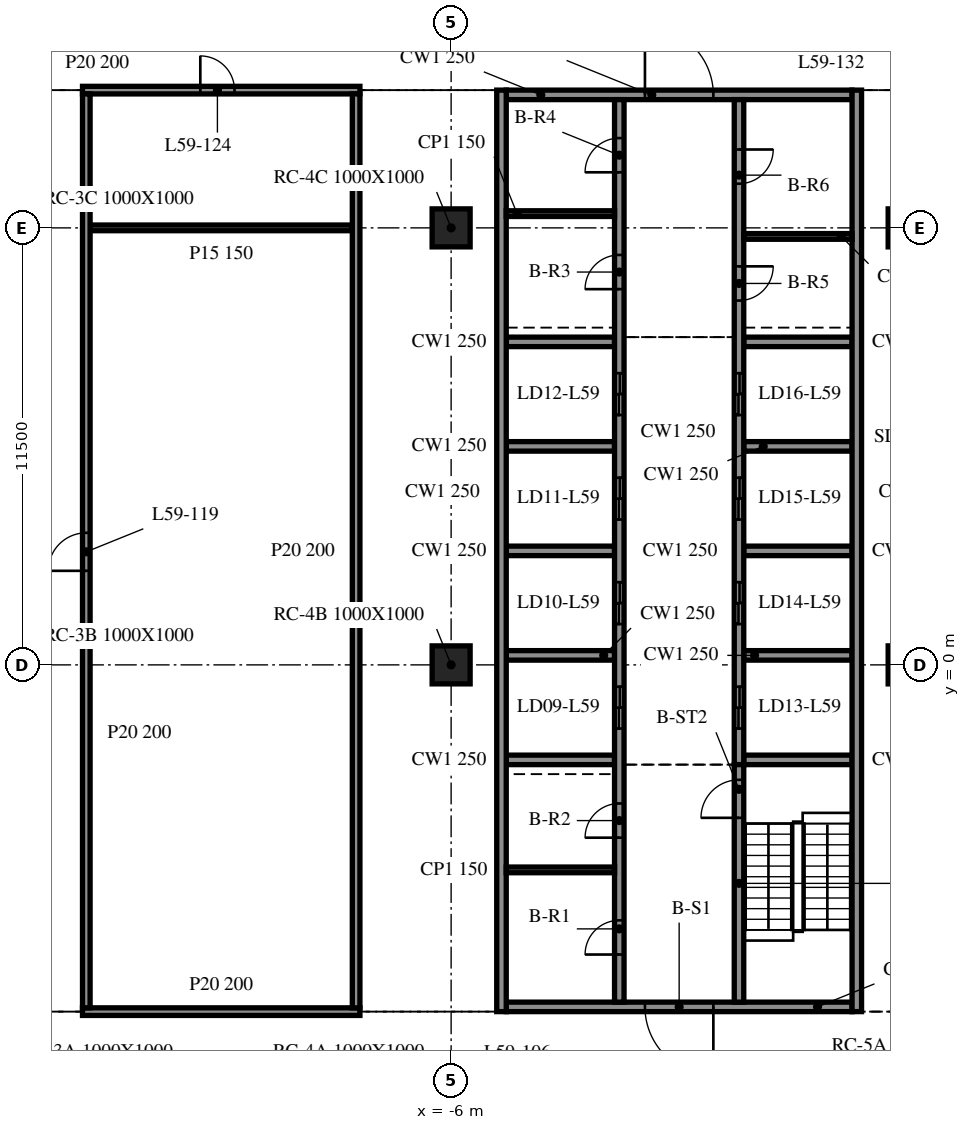
"""IFC4 building model, lengths in metres.
Left out: names, types, materials, properties, quantities, classifications, styles, units other than length and angle.
Written with IfcOpenShell. Run it as: python <this file> out.ifc"""

import sys

from ifc_helpers import new_model, si_unit, direction, frame, frame_2d, origin, origin_2d, place, context, subcontext, project, spatial, rectangle, extrude, element, fill, save


model = new_model("IFC4")
c1 = context("Model", 3, precision=1e-05, world=origin(), true_north=direction((0.0, 1.0)))
c2 = subcontext(c1, "Body", "Model", "MODEL_VIEW")
j1 = project(units=[si_unit("LENGTHUNIT", "METRE"), si_unit("PLANEANGLEUNIT", "RADIAN")], contexts=[c1])
p1 = place(None, origin())
s1 = spatial("IfcSite", under=j1, at=p1, CompositionType="ELEMENT")
p2 = place(p1, origin())
s2 = spatial("IfcBuilding", under=s1, at=p2, CompositionType="ELEMENT")
p3 = place(p2, frame((0.0, 0.0, 243.8)))
s3 = spatial("IfcBuildingStorey", under=s2, at=p3, CompositionType="ELEMENT", Elevation=243.8)
for number, where, z_axis, x_axis in (
    (1, (-6.0, 0.0, -0.34), (0.0, 0.0, 1.0), (1.0, 0.0, 0.0)),
    (2, (-6.0, 11.5, -0.34), (0.0, 0.0, 1.0), (1.0, 0.0, 0.0)),
    (3, (6.0, 0.0, -0.34), (0.0, 0.0, 1.0), (1.0, 0.0, 0.0)),
    (4, (6.0, 11.5, -0.34), (0.0, 0.0, 1.0), (1.0, 0.0, 0.0)),
):
    element("IfcColumn", number, at=place(p3, frame(where, z_axis=z_axis, x_axis=x_axis)), inside=s3, PredefinedType="COLUMN", context=c2, shape_type="SweptSolid", body=[
        extrude(rectangle(XDim=1.0, YDim=1.0, at=origin_2d()), origin(), (0.0, 0.0, 1.0), 3.8),
    ])
for number, where, z_axis, x_axis in (
    (5, (-4.675, 15.125, 0.0), (0.0, 0.0, 1.0), (0.0, -1.0, 0.0)),
    (6, (4.675, -9.125, 0.0), (0.0, 0.0, 1.0), (0.0, 1.0, 0.0)),
):
    element("IfcWall", number, at=place(p3, frame(where, z_axis=z_axis, x_axis=x_axis)), inside=s3, PredefinedType="SOLIDWALL", context=c2, shape_type="SweptSolid", body=[
        extrude(rectangle(XDim=24.25, YDim=0.25, at=frame_2d((12.125, 0.0))), origin(), (0.0, 0.0, 1.0), 3.46),
    ])
p4 = place(p3, frame((4.55, -9.0, 0.0), z_axis=(0.0, 0.0, 1.0), x_axis=(-1.0, 0.0, 0.0)))
e7 = element("IfcWall", 7, at=p4, inside=s3, PredefinedType="SOLIDWALL", context=c2, shape_type="SweptSolid", body=[
    extrude(rectangle(XDim=9.1, YDim=0.25, at=frame_2d((4.55, 0.0))), origin(), (0.0, 0.0, 1.0), 3.46),
])
p5 = place(p4, frame((3.65, 0.0, 0.0)))
e8 = element("IfcOpeningElement", 8, at=p5, cuts=e7, PredefinedType="OPENING", context=c2, shape_type="SweptSolid", body=[
    extrude(rectangle(XDim=1.8, YDim=2.1, at=frame_2d((0.9, 1.05))), frame((0.0, 0.135, 0.0), z_axis=(0.0, -1.0, 0.0), x_axis=(1.0, 0.0, 0.0)), (0.0, 0.0, 1.0), 0.27),
])
p6 = place(p3, frame((-4.55, 15.0, 0.0), z_axis=(0.0, 0.0, 1.0), x_axis=(1.0, 0.0, 0.0)))
e9 = element("IfcWall", 9, at=p6, inside=s3, PredefinedType="SOLIDWALL", context=c2, shape_type="SweptSolid", body=[
    extrude(rectangle(XDim=9.1, YDim=0.25, at=frame_2d((4.55, 0.0))), origin(), (0.0, 0.0, 1.0), 3.46),
])
p7 = place(p6, frame((3.65, 0.0, 0.0)))
e10 = element("IfcOpeningElement", 10, at=p7, cuts=e9, PredefinedType="OPENING", context=c2, shape_type="SweptSolid", body=[
    extrude(rectangle(XDim=1.8, YDim=2.1, at=frame_2d((0.9, 1.05))), frame((0.0, 0.135, 0.0), z_axis=(0.0, -1.0, 0.0), x_axis=(1.0, 0.0, 0.0)), (0.0, 0.0, 1.0), 0.27),
])
p8 = place(p3, frame((-1.575, -8.875, 0.0), z_axis=(0.0, 0.0, 1.0), x_axis=(0.0, 1.0, 0.0)))
e11 = element("IfcWall", 11, at=p8, inside=s3, PredefinedType="SOLIDWALL", context=c2, shape_type="SweptSolid", body=[
    extrude(rectangle(XDim=23.75, YDim=0.25, at=frame_2d((11.875, 0.0))), origin(), (0.0, 0.0, 1.0), 3.46),
])
p9 = place(p8, frame((7.2, 0.0, 0.0)))
e12 = element("IfcOpeningElement", 12, at=p9, cuts=e11, PredefinedType="OPENING", context=c2, shape_type="SweptSolid", body=[
    extrude(rectangle(XDim=1.1, YDim=2.1, at=frame_2d((0.55, 1.05))), frame((0.0, 0.135, 0.0), z_axis=(0.0, -1.0, 0.0), x_axis=(1.0, 0.0, 0.0)), (0.0, 0.0, 1.0), 0.27),
])
p10 = place(p8, frame((9.95, 0.0, 0.0)))
e13 = element("IfcOpeningElement", 13, at=p10, cuts=e11, PredefinedType="OPENING", context=c2, shape_type="SweptSolid", body=[
    extrude(rectangle(XDim=1.1, YDim=2.1, at=frame_2d((0.55, 1.05))), frame((0.0, 0.135, 0.0), z_axis=(0.0, -1.0, 0.0), x_axis=(1.0, 0.0, 0.0)), (0.0, 0.0, 1.0), 0.27),
])
p11 = place(p8, frame((12.7, 0.0, 0.0)))
e14 = element("IfcOpeningElement", 14, at=p11, cuts=e11, PredefinedType="OPENING", context=c2, shape_type="SweptSolid", body=[
    extrude(rectangle(XDim=1.1, YDim=2.1, at=frame_2d((0.55, 1.05))), frame((0.0, 0.135, 0.0), z_axis=(0.0, -1.0, 0.0), x_axis=(1.0, 0.0, 0.0)), (0.0, 0.0, 1.0), 0.27),
])
p12 = place(p8, frame((15.45, 0.0, 0.0)))
e15 = element("IfcOpeningElement", 15, at=p12, cuts=e11, PredefinedType="OPENING", context=c2, shape_type="SweptSolid", body=[
    extrude(rectangle(XDim=1.1, YDim=2.1, at=frame_2d((0.55, 1.05))), frame((0.0, 0.135, 0.0), z_axis=(0.0, -1.0, 0.0), x_axis=(1.0, 0.0, 0.0)), (0.0, 0.0, 1.0), 0.27),
])
p13 = place(p8, frame((1.252, 0.0, 0.0)))
e16 = element("IfcOpeningElement", 16, at=p13, cuts=e11, PredefinedType="OPENING", context=c2, shape_type="SweptSolid", body=[
    extrude(rectangle(XDim=0.9, YDim=2.1, at=frame_2d((0.45, 1.05))), frame((0.0, 0.135, 0.0), z_axis=(0.0, -1.0, 0.0), x_axis=(1.0, 0.0, 0.0)), (0.0, 0.0, 1.0), 0.27),
])
p14 = place(p8, frame((4.327, 0.0, 0.0)))
e17 = element("IfcOpeningElement", 17, at=p14, cuts=e11, PredefinedType="OPENING", context=c2, shape_type="SweptSolid", body=[
    extrude(rectangle(XDim=0.9, YDim=2.1, at=frame_2d((0.45, 1.05))), frame((0.0, 0.135, 0.0), z_axis=(0.0, -1.0, 0.0), x_axis=(1.0, 0.0, 0.0)), (0.0, 0.0, 1.0), 0.27),
])
p15 = place(p8, frame((18.762, 0.0, 0.0)))
e18 = element("IfcOpeningElement", 18, at=p15, cuts=e11, PredefinedType="OPENING", context=c2, shape_type="SweptSolid", body=[
    extrude(rectangle(XDim=0.9, YDim=2.1, at=frame_2d((0.45, 1.05))), frame((0.0, 0.135, 0.0), z_axis=(0.0, -1.0, 0.0), x_axis=(1.0, 0.0, 0.0)), (0.0, 0.0, 1.0), 0.27),
])
p16 = place(p8, frame((21.837, 0.0, 0.0)))
e19 = element("IfcOpeningElement", 19, at=p16, cuts=e11, PredefinedType="OPENING", context=c2, shape_type="SweptSolid", body=[
    extrude(rectangle(XDim=0.9, YDim=2.1, at=frame_2d((0.45, 1.05))), frame((0.0, 0.135, 0.0), z_axis=(0.0, -1.0, 0.0), x_axis=(1.0, 0.0, 0.0)), (0.0, 0.0, 1.0), 0.27),
])
p17 = place(p3, frame((1.575, -8.875, 0.0), z_axis=(0.0, 0.0, 1.0), x_axis=(0.0, 1.0, 0.0)))
e20 = element("IfcWall", 20, at=p17, inside=s3, PredefinedType="SOLIDWALL", context=c2, shape_type="SweptSolid", body=[
    extrude(rectangle(XDim=6.25, YDim=0.25, at=frame_2d((3.125, 0.0))), origin(), (0.0, 0.0, 1.0), 3.46),
])
p18 = place(p17, frame((4.85, 0.0, 0.0)))
e21 = element("IfcOpeningElement", 21, at=p18, cuts=e20, PredefinedType="OPENING", context=c2, shape_type="SweptSolid", body=[
    extrude(rectangle(XDim=1.0, YDim=2.1, at=frame_2d((0.5, 1.05))), frame((0.0, 0.135, 0.0), z_axis=(0.0, -1.0, 0.0), x_axis=(1.0, 0.0, 0.0)), (0.0, 0.0, 1.0), 0.27),
])
p19 = place(p3, frame((1.575, 14.875, 0.0), z_axis=(0.0, 0.0, 1.0), x_axis=(0.0, -1.0, 0.0)))
e22 = element("IfcWall", 22, at=p19, inside=s3, PredefinedType="SOLIDWALL", context=c2, shape_type="SweptSolid", body=[
    extrude(rectangle(XDim=17.5, YDim=0.25, at=frame_2d((8.75, 0.0))), origin(), (0.0, 0.0, 1.0), 3.46),
])
p20 = place(p19, frame((15.45, 0.0, 0.0)))
e23 = element("IfcOpeningElement", 23, at=p20, cuts=e22, PredefinedType="OPENING", context=c2, shape_type="SweptSolid", body=[
    extrude(rectangle(XDim=1.1, YDim=2.1, at=frame_2d((0.55, 1.05))), frame((0.0, 0.135, 0.0), z_axis=(0.0, -1.0, 0.0), x_axis=(1.0, 0.0, 0.0)), (0.0, 0.0, 1.0), 0.27),
])
p21 = place(p19, frame((12.7, 0.0, 0.0)))
e24 = element("IfcOpeningElement", 24, at=p21, cuts=e22, PredefinedType="OPENING", context=c2, shape_type="SweptSolid", body=[
    extrude(rectangle(XDim=1.1, YDim=2.1, at=frame_2d((0.55, 1.05))), frame((0.0, 0.135, 0.0), z_axis=(0.0, -1.0, 0.0), x_axis=(1.0, 0.0, 0.0)), (0.0, 0.0, 1.0), 0.27),
])
p22 = place(p19, frame((9.95, 0.0, 0.0)))
e25 = element("IfcOpeningElement", 25, at=p22, cuts=e22, PredefinedType="OPENING", context=c2, shape_type="SweptSolid", body=[
    extrude(rectangle(XDim=1.1, YDim=2.1, at=frame_2d((0.55, 1.05))), frame((0.0, 0.135, 0.0), z_axis=(0.0, -1.0, 0.0), x_axis=(1.0, 0.0, 0.0)), (0.0, 0.0, 1.0), 0.27),
])
p23 = place(p19, frame((7.2, 0.0, 0.0)))
e26 = element("IfcOpeningElement", 26, at=p23, cuts=e22, PredefinedType="OPENING", context=c2, shape_type="SweptSolid", body=[
    extrude(rectangle(XDim=1.1, YDim=2.1, at=frame_2d((0.55, 1.05))), frame((0.0, 0.135, 0.0), z_axis=(0.0, -1.0, 0.0), x_axis=(1.0, 0.0, 0.0)), (0.0, 0.0, 1.0), 0.27),
])
p24 = place(p19, frame((4.387, 0.0, 0.0)))
e27 = element("IfcOpeningElement", 27, at=p24, cuts=e22, PredefinedType="OPENING", context=c2, shape_type="SweptSolid", body=[
    extrude(rectangle(XDim=0.9, YDim=2.1, at=frame_2d((0.45, 1.05))), frame((0.0, 0.135, 0.0), z_axis=(0.0, -1.0, 0.0), x_axis=(1.0, 0.0, 0.0)), (0.0, 0.0, 1.0), 0.27),
])
p25 = place(p19, frame((1.312, 0.0, 0.0)))
e28 = element("IfcOpeningElement", 28, at=p25, cuts=e22, PredefinedType="OPENING", context=c2, shape_type="SweptSolid", body=[
    extrude(rectangle(XDim=0.9, YDim=2.1, at=frame_2d((0.45, 1.05))), frame((0.0, 0.135, 0.0), z_axis=(0.0, -1.0, 0.0), x_axis=(1.0, 0.0, 0.0)), (0.0, 0.0, 1.0), 0.27),
])
for number, where, z_axis, x_axis in (
    (29, (-4.55, -2.5, 0.0), (0.0, 0.0, 1.0), (1.0, 0.0, 0.0)),
    (30, (-4.55, 0.25, 0.0), (0.0, 0.0, 1.0), (1.0, 0.0, 0.0)),
    (31, (-4.55, 3.0, 0.0), (0.0, 0.0, 1.0), (1.0, 0.0, 0.0)),
    (32, (-4.55, 5.75, 0.0), (0.0, 0.0, 1.0), (1.0, 0.0, 0.0)),
    (33, (-4.55, 8.5, 0.0), (0.0, 0.0, 1.0), (1.0, 0.0, 0.0)),
    (34, (1.7, -2.5, 0.0), (0.0, 0.0, 1.0), (1.0, 0.0, 0.0)),
    (35, (1.7, 0.25, 0.0), (0.0, 0.0, 1.0), (1.0, 0.0, 0.0)),
    (36, (1.7, 3.0, 0.0), (0.0, 0.0, 1.0), (1.0, 0.0, 0.0)),
    (37, (1.7, 5.75, 0.0), (0.0, 0.0, 1.0), (1.0, 0.0, 0.0)),
    (38, (1.7, 8.5, 0.0), (0.0, 0.0, 1.0), (1.0, 0.0, 0.0)),
):
    element("IfcWall", number, at=place(p3, frame(where, z_axis=z_axis, x_axis=x_axis)), inside=s3, PredefinedType="SOLIDWALL", context=c2, shape_type="SweptSolid", body=[
        extrude(rectangle(XDim=2.85, YDim=0.25, at=frame_2d((1.425, 0.0))), origin(), (0.0, 0.0, 1.0), 3.46),
    ])
for number, where, z_axis, x_axis in (
    (39, (-4.55, -5.395, 0.0), (0.0, 0.0, 1.0), (1.0, 0.0, 0.0)),
    (40, (-4.55, 11.875, 0.0), (0.0, 0.0, 1.0), (1.0, 0.0, 0.0)),
    (41, (1.7, 11.275, 0.0), (0.0, 0.0, 1.0), (1.0, 0.0, 0.0)),
):
    element("IfcWall", number, at=place(p3, frame(where, z_axis=z_axis, x_axis=x_axis)), inside=s3, PredefinedType="PARTITIONING", context=c2, shape_type="SweptSolid", body=[
        extrude(rectangle(XDim=2.85, YDim=0.15, at=frame_2d((1.425, 0.0))), origin(), (0.0, 0.0, 1.0), 3.46),
    ])
p26 = place(p3, frame((-15.7, -9.125, 0.0), z_axis=(0.0, 0.0, 1.0), x_axis=(1.0, 0.0, 0.0)))
e42 = element("IfcWall", 42, at=p26, inside=s3, PredefinedType="PARTITIONING", context=c2, shape_type="SweptSolid", body=[
    extrude(rectangle(XDim=7.3, YDim=0.2, at=frame_2d((3.65, 0.0))), origin(), (0.0, 0.0, 1.0), 3.46),
])
p27 = place(p3, frame((-15.5, 11.5, 0.0), z_axis=(0.0, 0.0, 1.0), x_axis=(1.0, 0.0, 0.0)))
e43 = element("IfcWall", 43, at=p27, inside=s3, PredefinedType="PARTITIONING", context=c2, shape_type="SweptSolid", body=[
    extrude(rectangle(XDim=6.9, YDim=0.15, at=frame_2d((3.45, 0.0))), origin(), (0.0, 0.0, 1.0), 3.46),
])
p28 = place(p3, frame((-15.7, 15.125, 0.0), z_axis=(0.0, 0.0, 1.0), x_axis=(1.0, 0.0, 0.0)))
e44 = element("IfcWall", 44, at=p28, inside=s3, PredefinedType="PARTITIONING", context=c2, shape_type="SweptSolid", body=[
    extrude(rectangle(XDim=7.3, YDim=0.2, at=frame_2d((3.65, 0.0))), origin(), (0.0, 0.0, 1.0), 3.46),
])
p29 = place(p28, frame((3.1, 0.0, 0.0)))
e45 = element("IfcOpeningElement", 45, at=p29, cuts=e44, PredefinedType="OPENING", context=c2, shape_type="SweptSolid", body=[
    extrude(rectangle(XDim=0.9, YDim=2.1, at=frame_2d((0.45, 1.05))), frame((0.0, 0.11, 0.0), z_axis=(0.0, -1.0, 0.0), x_axis=(1.0, 0.0, 0.0)), (0.0, 0.0, 1.0), 0.22),
])
p30 = place(p3, frame((-15.6, -9.025, 0.0), z_axis=(0.0, 0.0, 1.0), x_axis=(0.0, 1.0, 0.0)))
e46 = element("IfcWall", 46, at=p30, inside=s3, PredefinedType="PARTITIONING", context=c2, shape_type="SweptSolid", body=[
    extrude(rectangle(XDim=24.05, YDim=0.2, at=frame_2d((12.025, 0.0))), origin(), (0.0, 0.0, 1.0), 3.46),
])
p31 = place(p30, frame((11.5, 0.0, 0.0)))
e47 = element("IfcOpeningElement", 47, at=p31, cuts=e46, PredefinedType="OPENING", context=c2, shape_type="SweptSolid", body=[
    extrude(rectangle(XDim=1.0, YDim=2.1, at=frame_2d((0.5, 1.05))), frame((0.0, 0.11, 0.0), z_axis=(0.0, -1.0, 0.0), x_axis=(1.0, 0.0, 0.0)), (0.0, 0.0, 1.0), 0.22),
])
p32 = place(p3, frame((-8.5, -9.025, 0.0), z_axis=(0.0, 0.0, 1.0), x_axis=(0.0, 1.0, 0.0)))
e48 = element("IfcWall", 48, at=p32, inside=s3, PredefinedType="PARTITIONING", context=c2, shape_type="SweptSolid", body=[
    extrude(rectangle(XDim=24.05, YDim=0.2, at=frame_2d((12.025, 0.0))), origin(), (0.0, 0.0, 1.0), 3.46),
])
p33 = place(p5, origin())
e49 = element("IfcDoor", 49, at=p33, inside=s3, OperationType="DOUBLE_DOOR_SINGLE_SWING", PredefinedType="DOOR", context=c2, shape_type="SweptSolid", body=[
    extrude(rectangle(XDim=1.8, YDim=2.1, at=frame_2d((0.9, 1.05))), frame((0.0, 0.025, 0.0), z_axis=(0.0, -1.0, 0.0), x_axis=(1.0, 0.0, 0.0)), (0.0, 0.0, 1.0), 0.05),
])
fill(e8, e49)
p34 = place(p7, origin())
e50 = element("IfcDoor", 50, at=p34, inside=s3, OperationType="DOUBLE_DOOR_SINGLE_SWING", PredefinedType="DOOR", context=c2, shape_type="SweptSolid", body=[
    extrude(rectangle(XDim=1.8, YDim=2.1, at=frame_2d((0.9, 1.05))), frame((0.0, 0.025, 0.0), z_axis=(0.0, -1.0, 0.0), x_axis=(1.0, 0.0, 0.0)), (0.0, 0.0, 1.0), 0.05),
])
fill(e10, e50)
p35 = place(p20, origin())
e51 = element("IfcDoor", 51, at=p35, inside=s3, OperationType="DOUBLE_DOOR_SLIDING", PredefinedType="DOOR", context=c2, shape_type="SweptSolid", body=[
    extrude(rectangle(XDim=1.1, YDim=2.1, at=frame_2d((0.55, 1.05))), frame((0.0, 0.025, 0.0), z_axis=(0.0, -1.0, 0.0), x_axis=(1.0, 0.0, 0.0)), (0.0, 0.0, 1.0), 0.05),
])
fill(e23, e51)
p36 = place(p21, origin())
e52 = element("IfcDoor", 52, at=p36, inside=s3, OperationType="DOUBLE_DOOR_SLIDING", PredefinedType="DOOR", context=c2, shape_type="SweptSolid", body=[
    extrude(rectangle(XDim=1.1, YDim=2.1, at=frame_2d((0.55, 1.05))), frame((0.0, 0.025, 0.0), z_axis=(0.0, -1.0, 0.0), x_axis=(1.0, 0.0, 0.0)), (0.0, 0.0, 1.0), 0.05),
])
fill(e24, e52)
p37 = place(p22, origin())
e53 = element("IfcDoor", 53, at=p37, inside=s3, OperationType="DOUBLE_DOOR_SLIDING", PredefinedType="DOOR", context=c2, shape_type="SweptSolid", body=[
    extrude(rectangle(XDim=1.1, YDim=2.1, at=frame_2d((0.55, 1.05))), frame((0.0, 0.025, 0.0), z_axis=(0.0, -1.0, 0.0), x_axis=(1.0, 0.0, 0.0)), (0.0, 0.0, 1.0), 0.05),
])
fill(e25, e53)
p38 = place(p23, origin())
e54 = element("IfcDoor", 54, at=p38, inside=s3, OperationType="DOUBLE_DOOR_SLIDING", PredefinedType="DOOR", context=c2, shape_type="SweptSolid", body=[
    extrude(rectangle(XDim=1.1, YDim=2.1, at=frame_2d((0.55, 1.05))), frame((0.0, 0.025, 0.0), z_axis=(0.0, -1.0, 0.0), x_axis=(1.0, 0.0, 0.0)), (0.0, 0.0, 1.0), 0.05),
])
fill(e26, e54)
p39 = place(p9, origin())
e55 = element("IfcDoor", 55, at=p39, inside=s3, OperationType="DOUBLE_DOOR_SLIDING", PredefinedType="DOOR", context=c2, shape_type="SweptSolid", body=[
    extrude(rectangle(XDim=1.1, YDim=2.1, at=frame_2d((0.55, 1.05))), frame((0.0, 0.025, 0.0), z_axis=(0.0, -1.0, 0.0), x_axis=(1.0, 0.0, 0.0)), (0.0, 0.0, 1.0), 0.05),
])
fill(e12, e55)
p40 = place(p10, origin())
e56 = element("IfcDoor", 56, at=p40, inside=s3, OperationType="DOUBLE_DOOR_SLIDING", PredefinedType="DOOR", context=c2, shape_type="SweptSolid", body=[
    extrude(rectangle(XDim=1.1, YDim=2.1, at=frame_2d((0.55, 1.05))), frame((0.0, 0.025, 0.0), z_axis=(0.0, -1.0, 0.0), x_axis=(1.0, 0.0, 0.0)), (0.0, 0.0, 1.0), 0.05),
])
fill(e13, e56)
p41 = place(p11, origin())
e57 = element("IfcDoor", 57, at=p41, inside=s3, OperationType="DOUBLE_DOOR_SLIDING", PredefinedType="DOOR", context=c2, shape_type="SweptSolid", body=[
    extrude(rectangle(XDim=1.1, YDim=2.1, at=frame_2d((0.55, 1.05))), frame((0.0, 0.025, 0.0), z_axis=(0.0, -1.0, 0.0), x_axis=(1.0, 0.0, 0.0)), (0.0, 0.0, 1.0), 0.05),
])
fill(e14, e57)
p42 = place(p12, origin())
e58 = element("IfcDoor", 58, at=p42, inside=s3, OperationType="DOUBLE_DOOR_SLIDING", PredefinedType="DOOR", context=c2, shape_type="SweptSolid", body=[
    extrude(rectangle(XDim=1.1, YDim=2.1, at=frame_2d((0.55, 1.05))), frame((0.0, 0.025, 0.0), z_axis=(0.0, -1.0, 0.0), x_axis=(1.0, 0.0, 0.0)), (0.0, 0.0, 1.0), 0.05),
])
fill(e15, e58)
p43 = place(p13, origin())
e59 = element("IfcDoor", 59, at=p43, inside=s3, OperationType="SINGLE_SWING_LEFT", PredefinedType="DOOR", context=c2, shape_type="SweptSolid", body=[
    extrude(rectangle(XDim=0.9, YDim=2.1, at=frame_2d((0.45, 1.05))), frame((0.0, 0.025, 0.0), z_axis=(0.0, -1.0, 0.0), x_axis=(1.0, 0.0, 0.0)), (0.0, 0.0, 1.0), 0.05),
])
fill(e16, e59)
p44 = place(p14, origin())
e60 = element("IfcDoor", 60, at=p44, inside=s3, OperationType="SINGLE_SWING_RIGHT", PredefinedType="DOOR", context=c2, shape_type="SweptSolid", body=[
    extrude(rectangle(XDim=0.9, YDim=2.1, at=frame_2d((0.45, 1.05))), frame((0.0, 0.025, 0.0), z_axis=(0.0, -1.0, 0.0), x_axis=(1.0, 0.0, 0.0)), (0.0, 0.0, 1.0), 0.05),
])
fill(e17, e60)
p45 = place(p15, origin())
e61 = element("IfcDoor", 61, at=p45, inside=s3, OperationType="SINGLE_SWING_LEFT", PredefinedType="DOOR", context=c2, shape_type="SweptSolid", body=[
    extrude(rectangle(XDim=0.9, YDim=2.1, at=frame_2d((0.45, 1.05))), frame((0.0, 0.025, 0.0), z_axis=(0.0, -1.0, 0.0), x_axis=(1.0, 0.0, 0.0)), (0.0, 0.0, 1.0), 0.05),
])
fill(e18, e61)
p46 = place(p16, origin())
e62 = element("IfcDoor", 62, at=p46, inside=s3, OperationType="SINGLE_SWING_RIGHT", PredefinedType="DOOR", context=c2, shape_type="SweptSolid", body=[
    extrude(rectangle(XDim=0.9, YDim=2.1, at=frame_2d((0.45, 1.05))), frame((0.0, 0.025, 0.0), z_axis=(0.0, -1.0, 0.0), x_axis=(1.0, 0.0, 0.0)), (0.0, 0.0, 1.0), 0.05),
])
fill(e19, e62)
p47 = place(p24, origin())
e63 = element("IfcDoor", 63, at=p47, inside=s3, OperationType="SINGLE_SWING_LEFT", PredefinedType="DOOR", context=c2, shape_type="SweptSolid", body=[
    extrude(rectangle(XDim=0.9, YDim=2.1, at=frame_2d((0.45, 1.05))), frame((0.0, 0.025, 0.0), z_axis=(0.0, -1.0, 0.0), x_axis=(1.0, 0.0, 0.0)), (0.0, 0.0, 1.0), 0.05),
])
fill(e27, e63)
p48 = place(p25, origin())
e64 = element("IfcDoor", 64, at=p48, inside=s3, OperationType="SINGLE_SWING_RIGHT", PredefinedType="DOOR", context=c2, shape_type="SweptSolid", body=[
    extrude(rectangle(XDim=0.9, YDim=2.1, at=frame_2d((0.45, 1.05))), frame((0.0, 0.025, 0.0), z_axis=(0.0, -1.0, 0.0), x_axis=(1.0, 0.0, 0.0)), (0.0, 0.0, 1.0), 0.05),
])
fill(e28, e64)
p49 = place(p18, origin())
e65 = element("IfcDoor", 65, at=p49, inside=s3, OperationType="SINGLE_SWING_LEFT", PredefinedType="DOOR", context=c2, shape_type="SweptSolid", body=[
    extrude(rectangle(XDim=1.0, YDim=2.1, at=frame_2d((0.5, 1.05))), frame((0.0, 0.025, 0.0), z_axis=(0.0, -1.0, 0.0), x_axis=(1.0, 0.0, 0.0)), (0.0, 0.0, 1.0), 0.05),
])
fill(e21, e65)
p50 = place(p31, origin())
e66 = element("IfcDoor", 66, at=p50, inside=s3, OperationType="SINGLE_SWING_RIGHT", PredefinedType="DOOR", context=c2, shape_type="SweptSolid", body=[
    extrude(rectangle(XDim=1.0, YDim=2.1, at=frame_2d((0.5, 1.05))), frame((0.0, 0.025, 0.0), z_axis=(0.0, -1.0, 0.0), x_axis=(1.0, 0.0, 0.0)), (0.0, 0.0, 1.0), 0.05),
])
fill(e47, e66)
p51 = place(p29, origin())
e67 = element("IfcDoor", 67, at=p51, inside=s3, OperationType="SINGLE_SWING_RIGHT", PredefinedType="DOOR", context=c2, shape_type="SweptSolid", body=[
    extrude(rectangle(XDim=0.9, YDim=2.1, at=frame_2d((0.45, 1.05))), frame((0.0, 0.025, 0.0), z_axis=(0.0, -1.0, 0.0), x_axis=(1.0, 0.0, 0.0)), (0.0, 0.0, 1.0), 0.05),
])
fill(e45, e67)
save(model, sys.argv[1])
